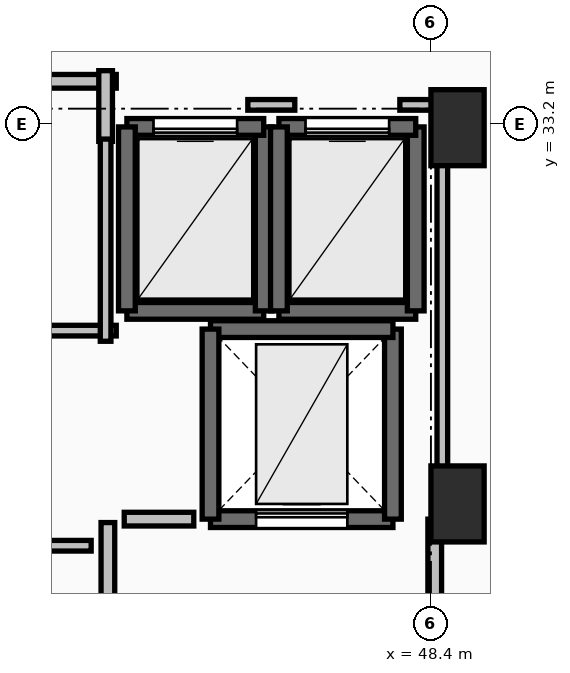
"""IFC4 building model, lengths in metres.
Left out: names, types, materials, properties, quantities, classifications, styles, units other than length and angle.
Written with IfcOpenShell. Run it as: python <this file> out.ifc"""

import sys

from ifc_helpers import new_model, si_unit, direction, frame, frame_2d, origin, origin_2d, place, context, subcontext, project, spatial, rectangle, extrude, element, fill, save


model = new_model("IFC4")
c1 = context("Model", 3, precision=1e-05, world=origin(), true_north=direction((0.0, 1.0)))
c2 = subcontext(c1, "Body", "Model", "MODEL_VIEW")
j1 = project(units=[si_unit("LENGTHUNIT", "METRE"), si_unit("PLANEANGLEUNIT", "RADIAN")], contexts=[c1])
p1 = place(None, origin())
s1 = spatial("IfcSite", under=j1, at=p1, CompositionType="ELEMENT")
p2 = place(p1, origin())
s2 = spatial("IfcBuilding", under=s1, at=p2, CompositionType="ELEMENT")
p3 = place(p2, frame((0.0, 0.0, 285.4)))
s3 = spatial("IfcBuildingStorey", under=s2, at=p3, CompositionType="ELEMENT", Elevation=285.4)
for number, where, z_axis, x_axis in (
    (1, (48.75, 33.15, 0.0), (0.0, 0.0, 1.0), (1.0, 0.0, 0.0)),
    (2, (48.75, 28.2, 0.0), (0.0, 0.0, 1.0), (1.0, 0.0, 0.0)),
):
    element("IfcColumn", number, at=place(p3, frame(where, z_axis=z_axis, x_axis=x_axis)), inside=s3, PredefinedType="PILASTER", context=c2, shape_type="SweptSolid", body=[
        extrude(rectangle(XDim=0.7, YDim=1.0, at=origin_2d()), origin(), (0.0, 0.0, 1.0), 5.0),
    ])
p4 = place(p3, frame((44.4, 30.74, 0.0), z_axis=(0.0, 0.0, 1.0), x_axis=(1.0, 0.0, 0.0)))
e3 = element("IfcWall", 3, at=p4, inside=s3, PredefinedType="SOLIDWALL", context=c2, shape_type="SweptSolid", body=[
    extrude(rectangle(XDim=1.8, YDim=0.22, at=frame_2d((0.9, 0.0))), origin(), (0.0, 0.0, 1.0), 4.69),
])
p5 = place(p3, frame((46.2, 30.74, 0.0), z_axis=(0.0, 0.0, 1.0), x_axis=(0.0, 1.0, 0.0)))
e4 = element("IfcWall", 4, at=p5, inside=s3, PredefinedType="SOLIDWALL", context=c2, shape_type="SweptSolid", body=[
    extrude(rectangle(XDim=2.42, YDim=0.22, at=frame_2d((1.21, 0.0))), origin(), (0.0, 0.0, 1.0), 4.69),
])
p6 = place(p3, frame((46.2, 33.16, 0.0), z_axis=(0.0, 0.0, 1.0), x_axis=(-1.0, 0.0, 0.0)))
e5 = element("IfcWall", 5, at=p6, inside=s3, PredefinedType="SOLIDWALL", context=c2, shape_type="SweptSolid", body=[
    extrude(rectangle(XDim=1.8, YDim=0.22, at=frame_2d((0.9, 0.0))), origin(), (0.0, 0.0, 1.0), 4.69),
])
p7 = place(p6, frame((0.35, 0.0, 0.0)))
e6 = element("IfcOpeningElement", 6, at=p7, cuts=e5, PredefinedType="OPENING", context=c2, shape_type="SweptSolid", body=[
    extrude(rectangle(XDim=1.1, YDim=2.2, at=frame_2d((0.55, 1.1))), frame((0.0, 0.125, 0.0), z_axis=(0.0, -1.0, 0.0), x_axis=(1.0, 0.0, 0.0)), (0.0, 0.0, 1.0), 0.25),
])
p8 = place(p3, frame((44.4, 33.16, 0.0), z_axis=(0.0, 0.0, 1.0), x_axis=(0.0, -1.0, 0.0)))
e7 = element("IfcWall", 7, at=p8, inside=s3, PredefinedType="SOLIDWALL", context=c2, shape_type="SweptSolid", body=[
    extrude(rectangle(XDim=2.42, YDim=0.22, at=frame_2d((1.21, 0.0))), origin(), (0.0, 0.0, 1.0), 4.69),
])
p9 = place(p3, frame((46.4, 30.74, 0.0), z_axis=(0.0, 0.0, 1.0), x_axis=(1.0, 0.0, 0.0)))
e8 = element("IfcWall", 8, at=p9, inside=s3, PredefinedType="SOLIDWALL", context=c2, shape_type="SweptSolid", body=[
    extrude(rectangle(XDim=1.8, YDim=0.22, at=frame_2d((0.9, 0.0))), origin(), (0.0, 0.0, 1.0), 4.69),
])
p10 = place(p3, frame((48.2, 30.74, 0.0), z_axis=(0.0, 0.0, 1.0), x_axis=(0.0, 1.0, 0.0)))
e9 = element("IfcWall", 9, at=p10, inside=s3, PredefinedType="SOLIDWALL", context=c2, shape_type="SweptSolid", body=[
    extrude(rectangle(XDim=2.42, YDim=0.22, at=frame_2d((1.21, 0.0))), origin(), (0.0, 0.0, 1.0), 4.69),
])
p11 = place(p3, frame((48.2, 33.16, 0.0), z_axis=(0.0, 0.0, 1.0), x_axis=(-1.0, 0.0, 0.0)))
e10 = element("IfcWall", 10, at=p11, inside=s3, PredefinedType="SOLIDWALL", context=c2, shape_type="SweptSolid", body=[
    extrude(rectangle(XDim=1.8, YDim=0.22, at=frame_2d((0.9, 0.0))), origin(), (0.0, 0.0, 1.0), 4.69),
])
p12 = place(p11, frame((0.35, 0.0, 0.0)))
e11 = element("IfcOpeningElement", 11, at=p12, cuts=e10, PredefinedType="OPENING", context=c2, shape_type="SweptSolid", body=[
    extrude(rectangle(XDim=1.1, YDim=2.2, at=frame_2d((0.55, 1.1))), frame((0.0, 0.125, 0.0), z_axis=(0.0, -1.0, 0.0), x_axis=(1.0, 0.0, 0.0)), (0.0, 0.0, 1.0), 0.25),
])
p13 = place(p3, frame((46.4, 33.16, 0.0), z_axis=(0.0, 0.0, 1.0), x_axis=(0.0, -1.0, 0.0)))
e12 = element("IfcWall", 12, at=p13, inside=s3, PredefinedType="SOLIDWALL", context=c2, shape_type="SweptSolid", body=[
    extrude(rectangle(XDim=2.42, YDim=0.22, at=frame_2d((1.21, 0.0))), origin(), (0.0, 0.0, 1.0), 4.69),
])
p14 = place(p3, frame((45.5, 28.0, 0.0), z_axis=(0.0, 0.0, 1.0), x_axis=(1.0, 0.0, 0.0)))
e13 = element("IfcWall", 13, at=p14, inside=s3, PredefinedType="SHEAR", context=c2, shape_type="SweptSolid", body=[
    extrude(rectangle(XDim=2.4, YDim=0.22, at=frame_2d((1.2, 0.0))), origin(), (0.0, 0.0, 1.0), 4.69),
])
p15 = place(p14, frame((0.6, 0.0, 0.0)))
e14 = element("IfcOpeningElement", 14, at=p15, cuts=e13, PredefinedType="OPENING", context=c2, shape_type="SweptSolid", body=[
    extrude(rectangle(XDim=1.2, YDim=2.2, at=frame_2d((0.6, 1.1))), frame((0.0, 0.125, 0.0), z_axis=(0.0, -1.0, 0.0), x_axis=(1.0, 0.0, 0.0)), (0.0, 0.0, 1.0), 0.25),
])
p16 = place(p3, frame((47.9, 28.0, 0.0), z_axis=(0.0, 0.0, 1.0), x_axis=(0.0, 1.0, 0.0)))
e15 = element("IfcWall", 15, at=p16, inside=s3, PredefinedType="SHEAR", context=c2, shape_type="SweptSolid", body=[
    extrude(rectangle(XDim=2.5, YDim=0.22, at=frame_2d((1.25, 0.0))), origin(), (0.0, 0.0, 1.0), 4.69),
])
p17 = place(p3, frame((47.9, 30.5, 0.0), z_axis=(0.0, 0.0, 1.0), x_axis=(-1.0, 0.0, 0.0)))
e16 = element("IfcWall", 16, at=p17, inside=s3, PredefinedType="SHEAR", context=c2, shape_type="SweptSolid", body=[
    extrude(rectangle(XDim=2.4, YDim=0.22, at=frame_2d((1.2, 0.0))), origin(), (0.0, 0.0, 1.0), 4.69),
])
p18 = place(p3, frame((45.5, 30.5, 0.0), z_axis=(0.0, 0.0, 1.0), x_axis=(0.0, -1.0, 0.0)))
e17 = element("IfcWall", 17, at=p18, inside=s3, PredefinedType="SHEAR", context=c2, shape_type="SweptSolid", body=[
    extrude(rectangle(XDim=2.5, YDim=0.22, at=frame_2d((1.25, 0.0))), origin(), (0.0, 0.0, 1.0), 4.69),
])
p19 = place(p3, frame((44.15, 27.955, 0.0), z_axis=(0.0, 0.0, 1.0), x_axis=(0.0, -1.0, 0.0)))
e18 = element("IfcWall", 18, at=p19, inside=s3, PredefinedType="PARTITIONING", context=c2, shape_type="SweptSolid", body=[
    extrude(rectangle(XDim=3.91, YDim=0.18, at=frame_2d((1.955, 0.0))), origin(), (0.0, 0.0, 1.0), 4.69),
])
p20 = place(p19, frame((1.355, 0.0, 0.0)))
e19 = element("IfcOpeningElement", 19, at=p20, cuts=e18, PredefinedType="OPENING", context=c2, shape_type="SweptSolid", body=[
    extrude(rectangle(XDim=1.2, YDim=2.15, at=frame_2d((0.6, 1.075))), frame((0.0, 0.105, 0.0), z_axis=(0.0, -1.0, 0.0), x_axis=(1.0, 0.0, 0.0)), (0.0, 0.0, 1.0), 0.21),
])
p21 = place(p3, frame((48.45, 23.95, 0.0), z_axis=(0.0, 0.0, 1.0), x_axis=(0.0, 1.0, 0.0)))
e20 = element("IfcWall", 20, at=p21, inside=s3, PredefinedType="PARTITIONING", context=c2, shape_type="SweptSolid", body=[
    extrude(rectangle(XDim=4.05, YDim=0.18, at=frame_2d((2.025, 0.0))), origin(), (0.0, 0.0, 1.0), 4.69),
])
p22 = place(p21, frame((1.425, 0.0, 0.0)))
e21 = element("IfcOpeningElement", 21, at=p22, cuts=e20, PredefinedType="OPENING", context=c2, shape_type="SweptSolid", body=[
    extrude(rectangle(XDim=1.2, YDim=2.15, at=frame_2d((0.6, 1.075))), frame((0.0, 0.105, 0.0), z_axis=(0.0, -1.0, 0.0), x_axis=(1.0, 0.0, 0.0)), (0.0, 0.0, 1.0), 0.21),
])
p23 = place(p3, frame((44.26, 33.76, 0.0), z_axis=(0.0, 0.0, 1.0), x_axis=(-1.0, 0.0, 0.0)))
e22 = element("IfcWall", 22, at=p23, inside=s3, PredefinedType="PARTITIONING", context=c2, shape_type="SweptSolid", body=[
    extrude(rectangle(XDim=4.61, YDim=0.18, at=frame_2d((2.305, 0.0))), origin(), (0.0, 0.0, 1.0), 4.69),
])
p24 = place(p23, frame((1.88, 0.0, 0.0)))
e23 = element("IfcOpeningElement", 23, at=p24, cuts=e22, PredefinedType="OPENING", context=c2, shape_type="SweptSolid", body=[
    extrude(rectangle(XDim=0.85, YDim=2.1, at=frame_2d((0.425, 1.05))), frame((0.0, 0.105, 0.0), z_axis=(0.0, -1.0, 0.0), x_axis=(1.0, 0.0, 0.0)), (0.0, 0.0, 1.0), 0.21),
])
p25 = place(p3, frame((44.12, 32.97, 0.0), z_axis=(0.0, 0.0, 1.0), x_axis=(0.0, 1.0, 0.0)))
e24 = element("IfcWall", 24, at=p25, inside=s3, PredefinedType="PARTITIONING", context=c2, shape_type="SweptSolid", body=[
    extrude(rectangle(XDim=0.93, YDim=0.18, at=frame_2d((0.465, 0.0))), origin(), (0.0, 0.0, 1.0), 4.69),
])
p26 = place(p3, frame((45.28, 28.0, 0.0), z_axis=(0.0, 0.0, 1.0), x_axis=(-1.0, 0.0, 0.0)))
e25 = element("IfcWall", 25, at=p26, inside=s3, PredefinedType="PARTITIONING", context=c2, shape_type="SweptSolid", body=[
    extrude(rectangle(XDim=0.915, YDim=0.18, at=frame_2d((0.458, 0.0))), origin(), (0.0, 0.0, 1.0), 4.69),
])
p27 = place(p3, frame((43.93, 27.65, 0.0), z_axis=(0.0, 0.0, 1.0), x_axis=(-1.0, 0.0, 0.0)))
e26 = element("IfcWall", 26, at=p27, inside=s3, PredefinedType="PARTITIONING", context=c2, shape_type="SweptSolid", body=[
    extrude(rectangle(XDim=4.52, YDim=0.14, at=frame_2d((2.26, 0.0))), origin(), (0.0, 0.0, 1.0), 4.69),
])
p28 = place(p3, frame((39.62, 30.48, 0.0), z_axis=(0.0, 0.0, 1.0), x_axis=(1.0, 0.0, 0.0)))
e27 = element("IfcWall", 27, at=p28, inside=s3, PredefinedType="PARTITIONING", context=c2, shape_type="SweptSolid", body=[
    extrude(rectangle(XDim=4.64, YDim=0.14, at=frame_2d((2.32, 0.0))), origin(), (0.0, 0.0, 1.0), 3.882),
])
p29 = place(p3, frame((44.12, 30.34, 0.0), z_axis=(0.0, 0.0, 1.0), x_axis=(0.0, 1.0, 0.0)))
e28 = element("IfcWall", 28, at=p29, inside=s3, PredefinedType="PARTITIONING", context=c2, shape_type="SweptSolid", body=[
    extrude(rectangle(XDim=2.66, YDim=0.14, at=frame_2d((1.33, 0.0))), origin(), (0.0, 0.0, 1.0), 4.69),
])
p30 = place(p3, frame((48.55, 28.196, 0.0), z_axis=(0.0, 0.0, 1.0), x_axis=(0.0, 1.0, 0.0)))
e29 = element("IfcWall", 29, at=p30, inside=s3, PredefinedType="PARTITIONING", context=c2, shape_type="SweptSolid", body=[
    extrude(rectangle(XDim=5.254, YDim=0.14, at=frame_2d((2.627, 0.0))), origin(), (0.0, 0.0, 1.0), 3.882),
])
p31 = place(p3, frame((48.55, 33.45, 0.0), z_axis=(0.0, 0.0, 1.0), x_axis=(-1.0, 0.0, 0.0)))
e30 = element("IfcWall", 30, at=p31, inside=s3, PredefinedType="PARTITIONING", context=c2, shape_type="SweptSolid", body=[
    extrude(rectangle(XDim=0.559, YDim=0.14, at=frame_2d((0.28, 0.0))), origin(), (0.0, 0.0, 1.0), 3.882),
])
p32 = place(p3, frame((46.609, 33.45, 0.0), z_axis=(0.0, 0.0, 1.0), x_axis=(-1.0, 0.0, 0.0)))
e31 = element("IfcWall", 31, at=p32, inside=s3, PredefinedType="PARTITIONING", context=c2, shape_type="SweptSolid", body=[
    extrude(rectangle(XDim=0.618, YDim=0.14, at=frame_2d((0.309, 0.0))), origin(), (0.0, 0.0, 1.0), 4.69),
])
p33 = place(p7, origin())
e32 = element("IfcDoor", 32, at=p33, inside=s3, OperationType="SLIDING_TO_LEFT", PredefinedType="DOOR", context=c2, shape_type="SweptSolid", body=[
    extrude(rectangle(XDim=1.1, YDim=2.2, at=frame_2d((0.55, 1.1))), frame((0.0, 0.025, 0.0), z_axis=(0.0, -1.0, 0.0), x_axis=(1.0, 0.0, 0.0)), (0.0, 0.0, 1.0), 0.05),
])
fill(e6, e32)
p34 = place(p12, origin())
e33 = element("IfcDoor", 33, at=p34, inside=s3, OperationType="SLIDING_TO_LEFT", PredefinedType="DOOR", context=c2, shape_type="SweptSolid", body=[
    extrude(rectangle(XDim=1.1, YDim=2.2, at=frame_2d((0.55, 1.1))), frame((0.0, 0.025, 0.0), z_axis=(0.0, -1.0, 0.0), x_axis=(1.0, 0.0, 0.0)), (0.0, 0.0, 1.0), 0.05),
])
fill(e11, e33)
p35 = place(p15, origin())
e34 = element("IfcDoor", 34, at=p35, inside=s3, OperationType="SLIDING_TO_LEFT", PredefinedType="DOOR", context=c2, shape_type="SweptSolid", body=[
    extrude(rectangle(XDim=1.2, YDim=2.2, at=frame_2d((0.6, 1.1))), frame((0.0, 0.025, 0.0), z_axis=(0.0, -1.0, 0.0), x_axis=(1.0, 0.0, 0.0)), (0.0, 0.0, 1.0), 0.05),
])
fill(e14, e34)
save(model, sys.argv[1])
